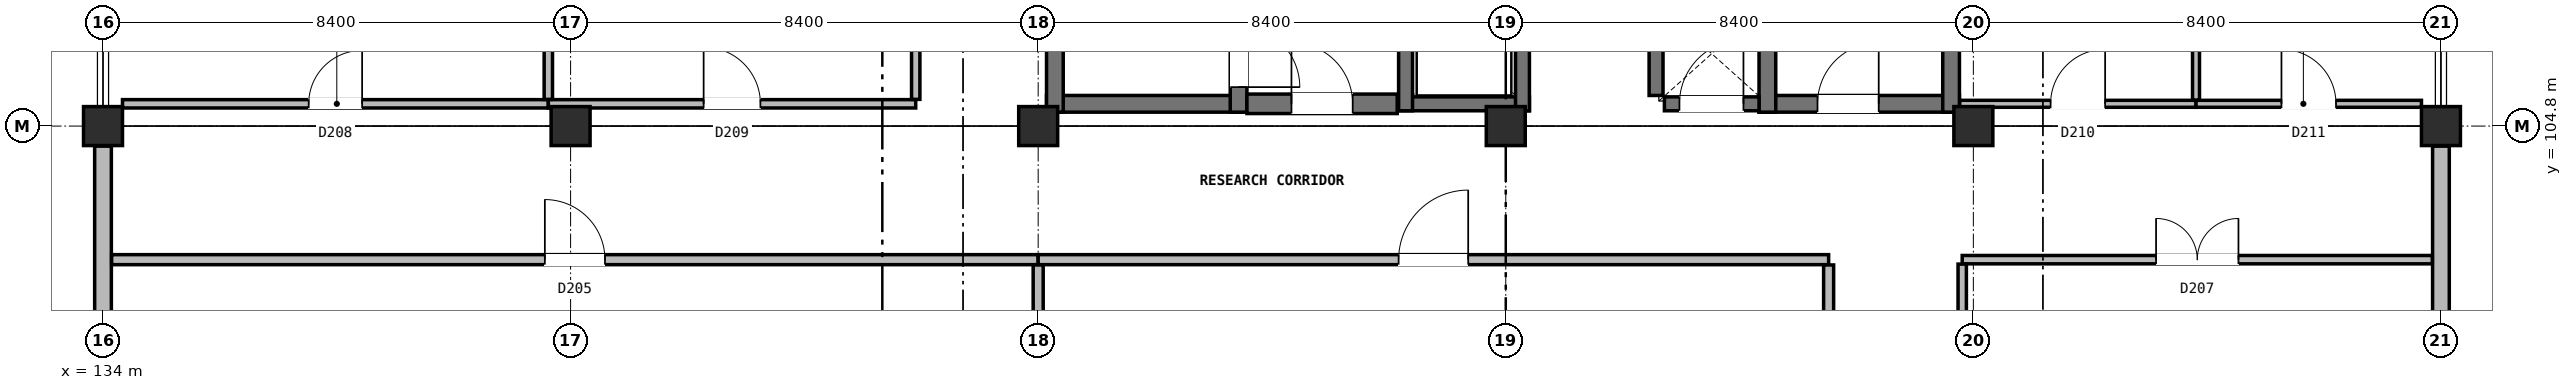
"""IFC4 building model, lengths in metres.
Left out: names, types, materials, properties, quantities, classifications, styles, units other than length and angle.
Written with IfcOpenShell. Run it as: python <this file> out.ifc"""

import sys

from ifc_helpers import new_model, si_unit, direction, frame, frame_2d, origin, origin_2d, place, context, subcontext, project, spatial, rectangle, extrude, element, fill, save


model = new_model("IFC4")
c1 = context("Model", 3, precision=1e-05, world=origin(), true_north=direction((0.0, 1.0)))
c2 = subcontext(c1, "Body", "Model", "MODEL_VIEW")
j1 = project(units=[si_unit("LENGTHUNIT", "METRE"), si_unit("PLANEANGLEUNIT", "RADIAN")], contexts=[c1])
p1 = place(None, origin())
s1 = spatial("IfcSite", under=j1, at=p1, CompositionType="ELEMENT")
p2 = place(p1, origin())
s2 = spatial("IfcBuilding", under=s1, at=p2, CompositionType="ELEMENT")
p3 = place(p2, frame((0.0, 0.0, 21.0)))
s3 = spatial("IfcBuildingStorey", under=s2, at=p3, CompositionType="ELEMENT", Elevation=21.0)
for number, where, z_axis, x_axis in (
    (1, (134.0, 104.8, 0.0), (0.0, 0.0, 1.0), (1.0, 0.0, 0.0)),
    (2, (142.4, 104.8, 0.0), (0.0, 0.0, 1.0), (1.0, 0.0, 0.0)),
    (3, (150.8, 104.8, 0.0), (0.0, 0.0, 1.0), (1.0, 0.0, 0.0)),
    (4, (159.2, 104.8, 0.0), (0.0, 0.0, 1.0), (1.0, 0.0, 0.0)),
    (5, (167.6, 104.8, 0.0), (0.0, 0.0, 1.0), (1.0, 0.0, 0.0)),
    (6, (176.0, 104.8, 0.0), (0.0, 0.0, 1.0), (1.0, 0.0, 0.0)),
):
    element("IfcColumn", number, at=place(p3, frame(where, z_axis=z_axis, x_axis=x_axis)), inside=s3, PredefinedType="COLUMN", context=c2, shape_type="SweptSolid", body=[
        extrude(rectangle(XDim=0.7, YDim=0.7, at=origin_2d()), origin(), (0.0, 0.0, 1.0), 3.8),
    ])
p4 = place(p3, frame((176.0, 96.36, 0.0), z_axis=(0.0, 0.0, 1.0), x_axis=(0.0, 1.0, 0.0)))
e7 = element("IfcWall", 7, at=p4, inside=s3, PredefinedType="SOLIDWALL", context=c2, shape_type="SweptSolid", body=[
    extrude(rectangle(XDim=8.08, YDim=0.3, at=frame_2d((4.04, 0.0))), origin(), (0.0, 0.0, 1.0), 2.95),
])
p5 = place(p4, frame((2.24, 0.0, 0.9)))
e8 = element("IfcOpeningElement", 8, at=p5, cuts=e7, PredefinedType="OPENING", context=c2, shape_type="SweptSolid", body=[
    extrude(rectangle(XDim=1.56, YDim=1.88, at=frame_2d((0.78, 0.94))), frame((0.0, 0.16, 0.0), z_axis=(0.0, -1.0, 0.0), x_axis=(1.0, 0.0, 0.0)), (0.0, 0.0, 1.0), 0.32),
])
p6 = place(p3, frame((134.0, 104.44, 0.0), z_axis=(0.0, 0.0, 1.0), x_axis=(0.0, -1.0, 0.0)))
e9 = element("IfcWall", 9, at=p6, inside=s3, PredefinedType="SOLIDWALL", context=c2, shape_type="SweptSolid", body=[
    extrude(rectangle(XDim=8.08, YDim=0.3, at=frame_2d((4.04, 0.0))), origin(), (0.0, 0.0, 1.0), 2.95),
])
p7 = place(p6, frame((4.085, 0.0, 0.9)))
e10 = element("IfcOpeningElement", 10, at=p7, cuts=e9, PredefinedType="OPENING", context=c2, shape_type="SweptSolid", body=[
    extrude(rectangle(XDim=1.95, YDim=1.9, at=frame_2d((0.975, 0.95))), frame((0.0, 0.16, 0.0), z_axis=(0.0, -1.0, 0.0), x_axis=(1.0, 0.0, 0.0)), (0.0, 0.0, 1.0), 0.32),
])
p8 = place(p3, frame((150.95, 105.2, 0.0), z_axis=(0.0, 0.0, 1.0), x_axis=(1.0, 0.0, 0.0)))
e11 = element("IfcWall", 11, at=p8, inside=s3, PredefinedType="SHEAR", context=c2, shape_type="SweptSolid", body=[
    extrude(rectangle(XDim=3.6, YDim=0.3, at=frame_2d((1.8, 0.0))), origin(), (0.0, 0.0, 1.0), 3.8),
])
p9 = place(p3, frame((151.1, 105.05, 0.0), z_axis=(0.0, 0.0, 1.0), x_axis=(0.0, 1.0, 0.0)))
e12 = element("IfcWall", 12, at=p9, inside=s3, PredefinedType="SHEAR", context=c2, shape_type="SweptSolid", body=[
    extrude(rectangle(XDim=8.3, YDim=0.3, at=frame_2d((4.15, 0.0))), origin(), (0.0, 0.0, 1.0), 3.8),
])
p10 = place(p3, frame((154.4, 105.05, 0.0), z_axis=(0.0, 0.0, 1.0), x_axis=(0.0, 1.0, 0.0)))
e13 = element("IfcWall", 13, at=p10, inside=s3, PredefinedType="SHEAR", context=c2, shape_type="SweptSolid", body=[
    extrude(rectangle(XDim=8.3, YDim=0.3, at=frame_2d((4.15, 0.0))), origin(), (0.0, 0.0, 1.0), 3.8),
])
p11 = place(p10, frame((0.45, 0.0, 0.0)))
e14 = element("IfcOpeningElement", 14, at=p11, cuts=e13, PredefinedType="OPENING", context=c2, shape_type="SweptSolid", body=[
    extrude(rectangle(XDim=1.1, YDim=2.2, at=frame_2d((0.55, 1.1))), frame((0.0, 0.16, 0.0), z_axis=(0.0, -1.0, 0.0), x_axis=(1.0, 0.0, 0.0)), (0.0, 0.0, 1.0), 0.32),
])
p12 = place(p3, frame((163.75, 105.2, 0.0), z_axis=(0.0, 0.0, 1.0), x_axis=(1.0, 0.0, 0.0)))
e15 = element("IfcWall", 15, at=p12, inside=s3, PredefinedType="SHEAR", context=c2, shape_type="SweptSolid", body=[
    extrude(rectangle(XDim=3.6, YDim=0.3, at=frame_2d((1.8, 0.0))), origin(), (0.0, 0.0, 1.0), 3.8),
])
p13 = place(p12, frame((1.05, 0.0, 0.0)))
e16 = element("IfcOpeningElement", 16, at=p13, cuts=e15, PredefinedType="OPENING", context=c2, shape_type="SweptSolid", body=[
    extrude(rectangle(XDim=1.1, YDim=2.2, at=frame_2d((0.55, 1.1))), frame((0.0, 0.16, 0.0), z_axis=(0.0, -1.0, 0.0), x_axis=(1.0, 0.0, 0.0)), (0.0, 0.0, 1.0), 0.32),
])
for number, where, z_axis, x_axis in (
    (17, (163.9, 105.05, 0.0), (0.0, 0.0, 1.0), (0.0, 1.0, 0.0)),
    (18, (167.2, 105.05, 0.0), (0.0, 0.0, 1.0), (0.0, 1.0, 0.0)),
):
    element("IfcWall", number, at=place(p3, frame(where, z_axis=z_axis, x_axis=x_axis)), inside=s3, PredefinedType="SHEAR", context=c2, shape_type="SweptSolid", body=[
        extrude(rectangle(XDim=8.3, YDim=0.3, at=frame_2d((4.15, 0.0))), origin(), (0.0, 0.0, 1.0), 3.8),
    ])
p14 = place(p3, frame((157.275, 105.2, 0.0), z_axis=(0.0, 0.0, 1.0), x_axis=(1.0, 0.0, 0.0)))
e19 = element("IfcWall", 19, at=p14, inside=s3, PredefinedType="SOLIDWALL", context=c2, shape_type="SweptSolid", body=[
    extrude(rectangle(XDim=2.35, YDim=0.25, at=frame_2d((1.175, 0.0))), origin(), (0.0, 0.0, 1.0), 3.48),
])
for number, where, z_axis, x_axis in (
    (20, (157.4, 105.075, 0.0), (0.0, 0.0, 1.0), (0.0, 1.0, 0.0)),
    (21, (159.5, 105.075, 0.0), (0.0, 0.0, 1.0), (0.0, 1.0, 0.0)),
):
    element("IfcWall", number, at=place(p3, frame(where, z_axis=z_axis, x_axis=x_axis)), inside=s3, PredefinedType="SOLIDWALL", context=c2, shape_type="SweptSolid", body=[
        extrude(rectangle(XDim=2.65, YDim=0.25, at=frame_2d((1.325, 0.0))), origin(), (0.0, 0.0, 1.0), 3.48),
    ])
p15 = place(p3, frame((154.55, 105.2, 0.0), z_axis=(0.0, 0.0, 1.0), x_axis=(1.0, 0.0, 0.0)))
e22 = element("IfcWall", 22, at=p15, inside=s3, PredefinedType="SHEAR", context=c2, shape_type="SweptSolid", body=[
    extrude(rectangle(XDim=2.7, YDim=0.35, at=frame_2d((1.35, 0.0))), origin(), (0.0, 0.0, 1.0), 3.48),
])
p16 = place(p15, frame((0.8, 0.0, 0.0)))
e23 = element("IfcOpeningElement", 23, at=p16, cuts=e22, PredefinedType="OPENING", context=c2, shape_type="SweptSolid", body=[
    extrude(rectangle(XDim=1.1, YDim=2.2, at=frame_2d((0.55, 1.1))), frame((0.0, 0.185, 0.0), z_axis=(0.0, -1.0, 0.0), x_axis=(1.0, 0.0, 0.0)), (0.0, 0.0, 1.0), 0.37),
])
p17 = place(p3, frame((161.9, 105.35, 0.0), z_axis=(0.0, 0.0, 1.0), x_axis=(0.0, 1.0, 0.0)))
e24 = element("IfcWall", 24, at=p17, inside=s3, PredefinedType="SOLIDWALL", context=c2, shape_type="SweptSolid", body=[
    extrude(rectangle(XDim=1.5, YDim=0.25, at=frame_2d((0.75, 0.0))), origin(), (0.0, 0.0, 1.0), 3.48),
])
p18 = place(p3, frame((162.05, 105.2, 0.0), z_axis=(0.0, 0.0, 1.0), x_axis=(1.0, 0.0, 0.0)))
e25 = element("IfcWall", 25, at=p18, inside=s3, PredefinedType="SOLIDWALL", context=c2, shape_type="SweptSolid", body=[
    extrude(rectangle(XDim=1.7, YDim=0.25, at=frame_2d((0.85, 0.0))), origin(), (0.0, 0.0, 1.0), 3.48),
])
p19 = place(p18, frame((0.27, 0.0, 0.0)))
e26 = element("IfcOpeningElement", 26, at=p19, cuts=e25, PredefinedType="OPENING", context=c2, shape_type="SweptSolid", body=[
    extrude(rectangle(XDim=1.15, YDim=2.2, at=frame_2d((0.575, 1.1))), frame((0.0, 0.135, 0.0), z_axis=(0.0, -1.0, 0.0), x_axis=(1.0, 0.0, 0.0)), (0.0, 0.0, 1.0), 0.27),
])
p20 = place(p3, frame((134.155, 102.4, 0.0), z_axis=(0.0, 0.0, 1.0), x_axis=(1.0, 0.0, 0.0)))
e27 = element("IfcWall", 27, at=p20, inside=s3, PredefinedType="PARTITIONING", context=c2, shape_type="SweptSolid", body=[
    extrude(rectangle(XDim=16.645, YDim=0.18, at=frame_2d((8.323, 0.0))), origin(), (0.0, 0.0, 1.0), 3.465),
])
p21 = place(p20, frame((7.782, 0.0, 0.0)))
e28 = element("IfcOpeningElement", 28, at=p21, cuts=e27, PredefinedType="OPENING", context=c2, shape_type="SweptSolid", body=[
    extrude(rectangle(XDim=1.08, YDim=2.22, at=frame_2d((0.54, 1.11))), frame((0.0, 0.1, 0.0), z_axis=(0.0, -1.0, 0.0), x_axis=(1.0, 0.0, 0.0)), (0.0, 0.0, 1.0), 0.2),
])
p22 = place(p3, frame((150.8, 102.4, 0.0), z_axis=(0.0, 0.0, 1.0), x_axis=(1.0, 0.0, 0.0)))
e29 = element("IfcWall", 29, at=p22, inside=s3, PredefinedType="PARTITIONING", context=c2, shape_type="SweptSolid", body=[
    extrude(rectangle(XDim=14.2, YDim=0.18, at=frame_2d((7.1, 0.0))), origin(), (0.0, 0.0, 1.0), 3.465),
])
p23 = place(p22, frame((6.475, 0.0, 0.0)))
e30 = element("IfcOpeningElement", 30, at=p23, cuts=e29, PredefinedType="OPENING", context=c2, shape_type="SweptSolid", body=[
    extrude(rectangle(XDim=1.25, YDim=2.18, at=frame_2d((0.625, 1.09))), frame((0.0, 0.1, 0.0), z_axis=(0.0, -1.0, 0.0), x_axis=(1.0, 0.0, 0.0)), (0.0, 0.0, 1.0), 0.2),
])
p24 = place(p3, frame((167.4, 102.4, 0.0), z_axis=(0.0, 0.0, 1.0), x_axis=(1.0, 0.0, 0.0)))
e31 = element("IfcWall", 31, at=p24, inside=s3, PredefinedType="PARTITIONING", context=c2, shape_type="SweptSolid", body=[
    extrude(rectangle(XDim=8.445, YDim=0.15, at=frame_2d((4.223, 0.0))), origin(), (0.0, 0.0, 1.0), 3.465),
])
p25 = place(p24, frame((3.482, 0.0, 0.0)))
e32 = element("IfcOpeningElement", 32, at=p25, cuts=e31, PredefinedType="OPENING", context=c2, shape_type="SweptSolid", body=[
    extrude(rectangle(XDim=1.48, YDim=2.2, at=frame_2d((0.74, 1.1))), frame((0.0, 0.085, 0.0), z_axis=(0.0, -1.0, 0.0), x_axis=(1.0, 0.0, 0.0)), (0.0, 0.0, 1.0), 0.17),
])
p26 = place(p3, frame((134.35, 105.2, 0.0), z_axis=(0.0, 0.0, 1.0), x_axis=(1.0, 0.0, 0.0)))
e33 = element("IfcWall", 33, at=p26, inside=s3, PredefinedType="PARTITIONING", context=c2, shape_type="SweptSolid", body=[
    extrude(rectangle(XDim=7.65, YDim=0.15, at=frame_2d((3.825, 0.0))), origin(), (0.0, 0.0, 1.0), 2.945),
])
p27 = place(p26, frame((3.345, 0.0, 0.0)))
e34 = element("IfcOpeningElement", 34, at=p27, cuts=e33, PredefinedType="OPENING", context=c2, shape_type="SweptSolid", body=[
    extrude(rectangle(XDim=0.96, YDim=2.14, at=frame_2d((0.48, 1.07))), frame((0.0, 0.085, 0.0), z_axis=(0.0, -1.0, 0.0), x_axis=(1.0, 0.0, 0.0)), (0.0, 0.0, 1.0), 0.17),
])
p28 = place(p3, frame((142.0, 105.2, 0.0), z_axis=(0.0, 0.0, 1.0), x_axis=(1.0, 0.0, 0.0)))
e35 = element("IfcWall", 35, at=p28, inside=s3, PredefinedType="PARTITIONING", context=c2, shape_type="SweptSolid", body=[
    extrude(rectangle(XDim=6.6, YDim=0.15, at=frame_2d((3.3, 0.0))), origin(), (0.0, 0.0, 1.0), 2.945),
])
p29 = place(p28, frame((2.79, 0.0, 0.0)))
e36 = element("IfcOpeningElement", 36, at=p29, cuts=e35, PredefinedType="OPENING", context=c2, shape_type="SweptSolid", body=[
    extrude(rectangle(XDim=1.02, YDim=2.16, at=frame_2d((0.51, 1.08))), frame((0.0, 0.085, 0.0), z_axis=(0.0, -1.0, 0.0), x_axis=(1.0, 0.0, 0.0)), (0.0, 0.0, 1.0), 0.17),
])
p30 = place(p3, frame((167.355, 105.2, 0.0), z_axis=(0.0, 0.0, 1.0), x_axis=(1.0, 0.0, 0.0)))
e37 = element("IfcWall", 37, at=p30, inside=s3, PredefinedType="PARTITIONING", context=c2, shape_type="SweptSolid", body=[
    extrude(rectangle(XDim=4.245, YDim=0.125, at=frame_2d((2.123, 0.0))), origin(), (0.0, 0.0, 1.0), 2.945),
])
p31 = place(p30, frame((1.633, 0.0, 0.0)))
e38 = element("IfcOpeningElement", 38, at=p31, cuts=e37, PredefinedType="OPENING", context=c2, shape_type="SweptSolid", body=[
    extrude(rectangle(XDim=0.98, YDim=2.1, at=frame_2d((0.49, 1.05))), frame((0.0, 0.073, 0.0), z_axis=(0.0, -1.0, 0.0), x_axis=(1.0, 0.0, 0.0)), (0.0, 0.0, 1.0), 0.145),
])
p32 = place(p3, frame((171.6, 105.2, 0.0), z_axis=(0.0, 0.0, 1.0), x_axis=(1.0, 0.0, 0.0)))
e39 = element("IfcWall", 39, at=p32, inside=s3, PredefinedType="PARTITIONING", context=c2, shape_type="SweptSolid", body=[
    extrude(rectangle(XDim=4.05, YDim=0.125, at=frame_2d((2.025, 0.0))), origin(), (0.0, 0.0, 1.0), 2.945),
])
p33 = place(p32, frame((1.535, 0.0, 0.0)))
e40 = element("IfcOpeningElement", 40, at=p33, cuts=e39, PredefinedType="OPENING", context=c2, shape_type="SweptSolid", body=[
    extrude(rectangle(XDim=0.98, YDim=2.1, at=frame_2d((0.49, 1.05))), frame((0.0, 0.073, 0.0), z_axis=(0.0, -1.0, 0.0), x_axis=(1.0, 0.0, 0.0)), (0.0, 0.0, 1.0), 0.145),
])
p34 = place(p3, frame((165.0, 88.0, 0.0), z_axis=(0.0, 0.0, 1.0), x_axis=(0.0, 1.0, 0.0)))
e41 = element("IfcWall", 41, at=p34, inside=s3, PredefinedType="PARTITIONING", context=c2, shape_type="SweptSolid", body=[
    extrude(rectangle(XDim=14.305, YDim=0.18, at=frame_2d((7.152, 0.0))), origin(), (0.0, 0.0, 1.0), 3.465),
])
p35 = place(p3, frame((167.4, 88.0, 0.0), z_axis=(0.0, 0.0, 1.0), x_axis=(0.0, 1.0, 0.0)))
e42 = element("IfcWall", 42, at=p35, inside=s3, PredefinedType="PARTITIONING", context=c2, shape_type="SweptSolid", body=[
    extrude(rectangle(XDim=14.32, YDim=0.15, at=frame_2d((7.16, 0.0))), origin(), (0.0, 0.0, 1.0), 2.945),
])
p36 = place(p3, frame((148.6, 105.28, 0.0), z_axis=(0.0, 0.0, 1.0), x_axis=(0.0, 1.0, 0.0)))
e43 = element("IfcWall", 43, at=p36, inside=s3, PredefinedType="PARTITIONING", context=c2, shape_type="SweptSolid", body=[
    extrude(rectangle(XDim=14.12, YDim=0.15, at=frame_2d((7.06, 0.0))), origin(), (0.0, 0.0, 1.0), 3.465),
])
p37 = place(p3, frame((150.8, 78.75, 0.0), z_axis=(0.0, 0.0, 1.0), x_axis=(0.0, 1.0, 0.0)))
e44 = element("IfcWall", 44, at=p37, inside=s3, PredefinedType="PARTITIONING", context=c2, shape_type="SweptSolid", body=[
    extrude(rectangle(XDim=23.555, YDim=0.18, at=frame_2d((11.777, 0.0))), origin(), (0.0, 0.0, 1.0), 2.945),
])
p38 = place(p3, frame((142.0, 105.28, 0.0), z_axis=(0.0, 0.0, 1.0), x_axis=(0.0, 1.0, 0.0)))
e45 = element("IfcWall", 45, at=p38, inside=s3, PredefinedType="PARTITIONING", context=c2, shape_type="SweptSolid", body=[
    extrude(rectangle(XDim=16.77, YDim=0.15, at=frame_2d((8.385, 0.0))), origin(), (0.0, 0.0, 1.0), 2.945),
])
p39 = place(p3, frame((171.6, 105.268, 0.0), z_axis=(0.0, 0.0, 1.0), x_axis=(0.0, 1.0, 0.0)))
e46 = element("IfcWall", 46, at=p39, inside=s3, PredefinedType="PARTITIONING", context=c2, shape_type="SweptSolid", body=[
    extrude(rectangle(XDim=16.978, YDim=0.125, at=frame_2d((8.489, 0.0))), origin(), (0.0, 0.0, 1.0), 3.465),
])
p40 = place(p11, frame((1.1, 0.0, 0.0), z_axis=(0.0, 0.0, 1.0), x_axis=(-1.0, 0.0, 0.0)))
e47 = element("IfcDoor", 47, at=p40, inside=s3, OperationType="SINGLE_SWING_LEFT", PredefinedType="DOOR", context=c2, shape_type="SweptSolid", body=[
    extrude(rectangle(XDim=1.1, YDim=2.2, at=frame_2d((0.55, 1.1))), frame((0.0, 0.025, 0.0), z_axis=(0.0, -1.0, 0.0), x_axis=(1.0, 0.0, 0.0)), (0.0, 0.0, 1.0), 0.05),
])
fill(e14, e47)
p41 = place(p13, origin())
e48 = element("IfcDoor", 48, at=p41, inside=s3, OperationType="SINGLE_SWING_RIGHT", PredefinedType="DOOR", context=c2, shape_type="SweptSolid", body=[
    extrude(rectangle(XDim=1.1, YDim=2.2, at=frame_2d((0.55, 1.1))), frame((0.0, 0.025, 0.0), z_axis=(0.0, -1.0, 0.0), x_axis=(1.0, 0.0, 0.0)), (0.0, 0.0, 1.0), 0.05),
])
fill(e16, e48)
p42 = place(p16, origin())
e49 = element("IfcDoor", 49, at=p42, inside=s3, OperationType="SINGLE_SWING_LEFT", PredefinedType="DOOR", context=c2, shape_type="SweptSolid", body=[
    extrude(rectangle(XDim=1.1, YDim=2.2, at=frame_2d((0.55, 1.1))), frame((0.0, 0.025, 0.0), z_axis=(0.0, -1.0, 0.0), x_axis=(1.0, 0.0, 0.0)), (0.0, 0.0, 1.0), 0.05),
])
fill(e23, e49)
p43 = place(p19, origin())
e50 = element("IfcDoor", 50, at=p43, inside=s3, OperationType="SINGLE_SWING_RIGHT", PredefinedType="DOOR", context=c2, shape_type="SweptSolid", body=[
    extrude(rectangle(XDim=1.15, YDim=2.2, at=frame_2d((0.575, 1.1))), frame((0.0, 0.025, 0.0), z_axis=(0.0, -1.0, 0.0), x_axis=(1.0, 0.0, 0.0)), (0.0, 0.0, 1.0), 0.05),
])
fill(e26, e50)
p44 = place(p21, origin())
e51 = element("IfcDoor", 51, at=p44, inside=s3, OperationType="SINGLE_SWING_LEFT", PredefinedType="DOOR", context=c2, shape_type="SweptSolid", body=[
    extrude(rectangle(XDim=1.08, YDim=2.22, at=frame_2d((0.54, 1.11))), frame((0.0, 0.025, 0.0), z_axis=(0.0, -1.0, 0.0), x_axis=(1.0, 0.0, 0.0)), (0.0, 0.0, 1.0), 0.05),
])
fill(e28, e51)
p45 = place(p23, origin())
e52 = element("IfcDoor", 52, at=p45, inside=s3, OperationType="SINGLE_SWING_RIGHT", PredefinedType="DOOR", context=c2, shape_type="SweptSolid", body=[
    extrude(rectangle(XDim=1.25, YDim=2.18, at=frame_2d((0.625, 1.09))), frame((0.0, 0.025, 0.0), z_axis=(0.0, -1.0, 0.0), x_axis=(1.0, 0.0, 0.0)), (0.0, 0.0, 1.0), 0.05),
])
fill(e30, e52)
p46 = place(p25, origin())
e53 = element("IfcDoor", 53, at=p46, inside=s3, OperationType="DOUBLE_DOOR_SINGLE_SWING", PredefinedType="DOOR", context=c2, shape_type="SweptSolid", body=[
    extrude(rectangle(XDim=1.48, YDim=2.2, at=frame_2d((0.74, 1.1))), frame((0.0, 0.025, 0.0), z_axis=(0.0, -1.0, 0.0), x_axis=(1.0, 0.0, 0.0)), (0.0, 0.0, 1.0), 0.05),
])
fill(e32, e53)
p47 = place(p27, origin())
e54 = element("IfcDoor", 54, at=p47, inside=s3, OperationType="SINGLE_SWING_RIGHT", PredefinedType="DOOR", context=c2, shape_type="SweptSolid", body=[
    extrude(rectangle(XDim=0.96, YDim=2.14, at=frame_2d((0.48, 1.07))), frame((0.0, 0.025, 0.0), z_axis=(0.0, -1.0, 0.0), x_axis=(1.0, 0.0, 0.0)), (0.0, 0.0, 1.0), 0.05),
])
fill(e34, e54)
p48 = place(p29, origin())
e55 = element("IfcDoor", 55, at=p48, inside=s3, OperationType="SINGLE_SWING_LEFT", PredefinedType="DOOR", context=c2, shape_type="SweptSolid", body=[
    extrude(rectangle(XDim=1.02, YDim=2.16, at=frame_2d((0.51, 1.08))), frame((0.0, 0.025, 0.0), z_axis=(0.0, -1.0, 0.0), x_axis=(1.0, 0.0, 0.0)), (0.0, 0.0, 1.0), 0.05),
])
fill(e36, e55)
p49 = place(p31, origin())
e56 = element("IfcDoor", 56, at=p49, inside=s3, OperationType="SINGLE_SWING_RIGHT", PredefinedType="DOOR", context=c2, shape_type="SweptSolid", body=[
    extrude(rectangle(XDim=0.98, YDim=2.1, at=frame_2d((0.49, 1.05))), frame((0.0, 0.025, 0.0), z_axis=(0.0, -1.0, 0.0), x_axis=(1.0, 0.0, 0.0)), (0.0, 0.0, 1.0), 0.05),
])
fill(e38, e56)
p50 = place(p33, origin())
e57 = element("IfcDoor", 57, at=p50, inside=s3, OperationType="SINGLE_SWING_LEFT", PredefinedType="DOOR", context=c2, shape_type="SweptSolid", body=[
    extrude(rectangle(XDim=0.98, YDim=2.1, at=frame_2d((0.49, 1.05))), frame((0.0, 0.025, 0.0), z_axis=(0.0, -1.0, 0.0), x_axis=(1.0, 0.0, 0.0)), (0.0, 0.0, 1.0), 0.05),
])
fill(e40, e57)
save(model, sys.argv[1])
